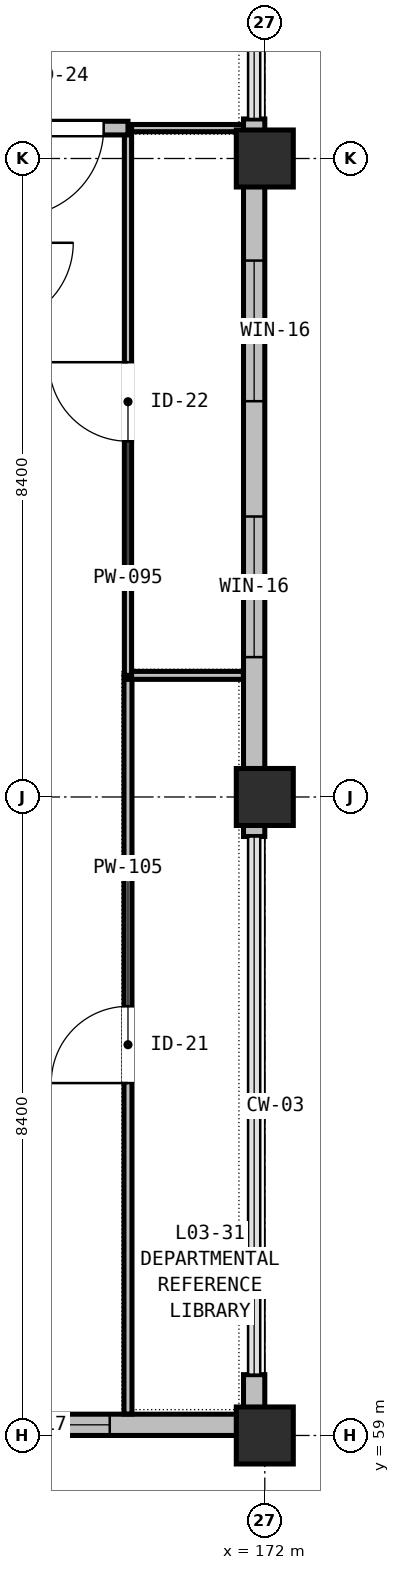
"""IFC4 building model, lengths in metres.
Left out: names, types, materials, properties, quantities, classifications, styles, units other than length and angle.
Written with IfcOpenShell. Run it as: python <this file> out.ifc"""

import sys

from ifc_helpers import new_model, si_unit, direction, frame, frame_2d, origin, origin_2d, place, context, subcontext, project, spatial, rectangle, extrude, element, fill, save


model = new_model("IFC4")
c1 = context("Model", 3, precision=1e-05, world=origin(), true_north=direction((0.0, 1.0)))
c2 = subcontext(c1, "Body", "Model", "MODEL_VIEW")
j1 = project(units=[si_unit("LENGTHUNIT", "METRE"), si_unit("PLANEANGLEUNIT", "RADIAN")], contexts=[c1])
p1 = place(None, origin())
s1 = spatial("IfcSite", under=j1, at=p1, CompositionType="ELEMENT")
p2 = place(p1, origin())
s2 = spatial("IfcBuilding", under=s1, at=p2, CompositionType="ELEMENT")
p3 = place(p2, frame((0.0, 0.0, 15.0)))
s3 = spatial("IfcBuildingStorey", under=s2, at=p3, CompositionType="ELEMENT", Elevation=15.0)
for number, where, z_axis, x_axis in (
    (1, (172.0, 59.0, 0.0), (0.0, 0.0, 1.0), (1.0, 0.0, 0.0)),
    (2, (172.0, 67.4, 0.0), (0.0, 0.0, 1.0), (1.0, 0.0, 0.0)),
    (3, (172.0, 75.8, 0.0), (0.0, 0.0, 1.0), (1.0, 0.0, 0.0)),
):
    element("IfcColumn", number, at=place(p3, frame(where, z_axis=z_axis, x_axis=x_axis)), inside=s3, PredefinedType="COLUMN", context=c2, shape_type="SweptSolid", body=[
        extrude(rectangle(XDim=0.75, YDim=0.75, at=origin_2d()), origin(), (0.0, 0.0, 1.0), 4.5),
    ])
p4 = place(p3, frame((171.86, 76.32, 0.0), z_axis=(0.0, 0.0, 1.0), x_axis=(0.0, -1.0, 0.0)))
e4 = element("IfcWall", 4, at=p4, inside=s3, PredefinedType="STANDARD", context=c2, shape_type="SweptSolid", body=[
    extrude(rectangle(XDim=0.52, YDim=0.28, at=frame_2d((0.26, 0.0))), origin(), (0.0, 0.0, 1.0), 3.785),
])
p5 = place(p3, frame((171.86, 75.8, 0.0), z_axis=(0.0, 0.0, 1.0), x_axis=(0.0, -1.0, 0.0)))
e5 = element("IfcWall", 5, at=p5, inside=s3, PredefinedType="STANDARD", context=c2, shape_type="SweptSolid", body=[
    extrude(rectangle(XDim=8.4, YDim=0.28, at=frame_2d((4.2, 0.0))), origin(), (0.0, 0.0, 1.0), 3.785),
])
p6 = place(p5, frame((1.343, 0.0, 0.9)))
e6 = element("IfcOpeningElement", 6, at=p6, cuts=e5, PredefinedType="OPENING", context=c2, shape_type="SweptSolid", body=[
    extrude(rectangle(XDim=1.85, YDim=1.6, at=frame_2d((0.925, 0.8))), frame((0.0, 0.15, 0.0), z_axis=(0.0, -1.0, 0.0), x_axis=(1.0, 0.0, 0.0)), (0.0, 0.0, 1.0), 0.3),
])
p7 = place(p5, frame((4.71, 0.0, 0.9)))
e7 = element("IfcOpeningElement", 7, at=p7, cuts=e5, PredefinedType="OPENING", context=c2, shape_type="SweptSolid", body=[
    extrude(rectangle(XDim=1.85, YDim=1.6, at=frame_2d((0.925, 0.8))), frame((0.0, 0.15, 0.0), z_axis=(0.0, -1.0, 0.0), x_axis=(1.0, 0.0, 0.0)), (0.0, 0.0, 1.0), 0.3),
])
for number, where, z_axis, x_axis in (
    (8, (171.86, 67.4, 0.0), (0.0, 0.0, 1.0), (0.0, -1.0, 0.0)),
    (9, (171.86, 59.8, 0.0), (0.0, 0.0, 1.0), (0.0, -1.0, 0.0)),
):
    element("IfcWall", number, at=place(p3, frame(where, z_axis=z_axis, x_axis=x_axis)), inside=s3, PredefinedType="STANDARD", context=c2, shape_type="SweptSolid", body=[
        extrude(rectangle(XDim=0.52, YDim=0.28, at=frame_2d((0.26, 0.0))), origin(), (0.0, 0.0, 1.0), 3.785),
    ])
p8 = place(p3, frame((172.0, 59.14, 0.0), z_axis=(0.0, 0.0, 1.0), x_axis=(-1.0, 0.0, 0.0)))
e10 = element("IfcWall", 10, at=p8, inside=s3, PredefinedType="STANDARD", context=c2, shape_type="SweptSolid", body=[
    extrude(rectangle(XDim=6.8, YDim=0.28, at=frame_2d((3.4, 0.0))), origin(), (0.0, 0.0, 1.0), 3.735),
])
p9 = place(p8, frame((2.04, 0.0, 0.9)))
e11 = element("IfcOpeningElement", 11, at=p9, cuts=e10, PredefinedType="OPENING", context=c2, shape_type="SweptSolid", body=[
    extrude(rectangle(XDim=2.05, YDim=1.65, at=frame_2d((1.025, 0.825))), frame((0.0, 0.15, 0.0), z_axis=(0.0, -1.0, 0.0), x_axis=(1.0, 0.0, 0.0)), (0.0, 0.0, 1.0), 0.3),
])
p10 = place(p3, frame((170.2, 59.282, 0.0), z_axis=(0.0, 0.0, 1.0), x_axis=(0.0, 1.0, 0.0)))
e12 = element("IfcWall", 12, at=p10, inside=s3, PredefinedType="PARTITIONING", context=c2, shape_type="SweptSolid", body=[
    extrude(rectangle(XDim=9.718, YDim=0.105, at=frame_2d((4.859, 0.0))), origin(), (0.0, 0.0, 1.0), 3.785),
])
p11 = place(p10, frame((4.354, 0.0, 0.0)))
e13 = element("IfcOpeningElement", 13, at=p11, cuts=e12, PredefinedType="OPENING", context=c2, shape_type="SweptSolid", body=[
    extrude(rectangle(XDim=1.01, YDim=2.14, at=frame_2d((0.505, 1.07))), frame((0.0, 0.062, 0.0), z_axis=(0.0, -1.0, 0.0), x_axis=(1.0, 0.0, 0.0)), (0.0, 0.0, 1.0), 0.125),
])
p12 = place(p3, frame((170.2, 69.0, 0.0), z_axis=(0.0, 0.0, 1.0), x_axis=(1.0, 0.0, 0.0)))
e14 = element("IfcWall", 14, at=p12, inside=s3, PredefinedType="PARTITIONING", context=c2, shape_type="SweptSolid", body=[
    extrude(rectangle(XDim=1.518, YDim=0.105, at=frame_2d((0.759, 0.0))), origin(), (0.0, 0.0, 1.0), 3.785),
])
p13 = place(p3, frame((170.2, 76.2, 0.0), z_axis=(0.0, 0.0, 1.0), x_axis=(1.0, 0.0, 0.0)))
e15 = element("IfcWall", 15, at=p13, inside=s3, PredefinedType="PARTITIONING", context=c2, shape_type="SweptSolid", body=[
    extrude(rectangle(XDim=1.518, YDim=0.095, at=frame_2d((0.759, 0.0))), origin(), (0.0, 0.0, 1.0), 3.785),
])
p14 = place(p3, frame((170.2, 69.0, 0.0), z_axis=(0.0, 0.0, 1.0), x_axis=(0.0, 1.0, 0.0)))
e16 = element("IfcWall", 16, at=p14, inside=s3, PredefinedType="PARTITIONING", context=c2, shape_type="SweptSolid", body=[
    extrude(rectangle(XDim=7.2, YDim=0.095, at=frame_2d((3.6, 0.0))), origin(), (0.0, 0.0, 1.0), 3.835),
])
p15 = place(p14, frame((3.08, 0.0, 0.0)))
e17 = element("IfcOpeningElement", 17, at=p15, cuts=e16, PredefinedType="OPENING", context=c2, shape_type="SweptSolid", body=[
    extrude(rectangle(XDim=1.04, YDim=2.14, at=frame_2d((0.52, 1.07))), frame((0.0, 0.057, 0.0), z_axis=(0.0, -1.0, 0.0), x_axis=(1.0, 0.0, 0.0)), (0.0, 0.0, 1.0), 0.115),
])
p16 = place(p3, frame((170.2, 76.2, 0.0), z_axis=(0.0, 0.0, 1.0), x_axis=(-1.0, 0.0, 0.0)))
e18 = element("IfcWall", 18, at=p16, inside=s3, PredefinedType="PARTITIONING", context=c2, shape_type="SweptSolid", body=[
    extrude(rectangle(XDim=1.8, YDim=0.18, at=frame_2d((0.9, 0.0))), origin(), (0.0, 0.0, 1.0), 3.985),
])
p17 = place(p16, frame((0.32, 0.0, 0.0)))
e19 = element("IfcOpeningElement", 19, at=p17, cuts=e18, PredefinedType="OPENING", context=c2, shape_type="SweptSolid", body=[
    extrude(rectangle(XDim=1.16, YDim=2.14, at=frame_2d((0.58, 1.07))), frame((0.0, 0.1, 0.0), z_axis=(0.0, -1.0, 0.0), x_axis=(1.0, 0.0, 0.0)), (0.0, 0.0, 1.0), 0.2),
])
p18 = place(p6, origin())
e20 = element("IfcWindow", 20, at=p18, inside=s3, PartitioningType="SINGLE_PANEL", PredefinedType="WINDOW", context=c2, shape_type="SweptSolid", body=[
    extrude(rectangle(XDim=1.85, YDim=1.6, at=frame_2d((0.925, 0.8))), frame((0.0, 0.03, 0.0), z_axis=(0.0, -1.0, 0.0), x_axis=(1.0, 0.0, 0.0)), (0.0, 0.0, 1.0), 0.06),
])
fill(e6, e20)
p19 = place(p7, origin())
e21 = element("IfcWindow", 21, at=p19, inside=s3, PartitioningType="SINGLE_PANEL", PredefinedType="WINDOW", context=c2, shape_type="SweptSolid", body=[
    extrude(rectangle(XDim=1.85, YDim=1.6, at=frame_2d((0.925, 0.8))), frame((0.0, 0.03, 0.0), z_axis=(0.0, -1.0, 0.0), x_axis=(1.0, 0.0, 0.0)), (0.0, 0.0, 1.0), 0.06),
])
fill(e7, e21)
p20 = place(p9, origin())
e22 = element("IfcWindow", 22, at=p20, inside=s3, PartitioningType="SINGLE_PANEL", PredefinedType="WINDOW", context=c2, shape_type="SweptSolid", body=[
    extrude(rectangle(XDim=2.05, YDim=1.65, at=frame_2d((1.025, 0.825))), frame((0.0, 0.03, 0.0), z_axis=(0.0, -1.0, 0.0), x_axis=(1.0, 0.0, 0.0)), (0.0, 0.0, 1.0), 0.06),
])
fill(e11, e22)
p21 = place(p11, origin())
e23 = element("IfcDoor", 23, at=p21, inside=s3, OperationType="SINGLE_SWING_LEFT", PredefinedType="DOOR", context=c2, shape_type="SweptSolid", body=[
    extrude(rectangle(XDim=1.01, YDim=2.14, at=frame_2d((0.505, 1.07))), frame((0.0, 0.025, 0.0), z_axis=(0.0, -1.0, 0.0), x_axis=(1.0, 0.0, 0.0)), (0.0, 0.0, 1.0), 0.05),
])
fill(e13, e23)
p22 = place(p15, origin())
e24 = element("IfcDoor", 24, at=p22, inside=s3, OperationType="SINGLE_SWING_RIGHT", PredefinedType="DOOR", context=c2, shape_type="SweptSolid", body=[
    extrude(rectangle(XDim=1.04, YDim=2.14, at=frame_2d((0.52, 1.07))), frame((0.0, 0.025, 0.0), z_axis=(0.0, -1.0, 0.0), x_axis=(1.0, 0.0, 0.0)), (0.0, 0.0, 1.0), 0.05),
])
fill(e17, e24)
p23 = place(p17, origin())
e25 = element("IfcDoor", 25, at=p23, inside=s3, OperationType="SINGLE_SWING_RIGHT", PredefinedType="DOOR", context=c2, shape_type="SweptSolid", body=[
    extrude(rectangle(XDim=1.16, YDim=2.14, at=frame_2d((0.58, 1.07))), frame((0.0, 0.025, 0.0), z_axis=(0.0, -1.0, 0.0), x_axis=(1.0, 0.0, 0.0)), (0.0, 0.0, 1.0), 0.05),
])
fill(e19, e25)
save(model, sys.argv[1])
